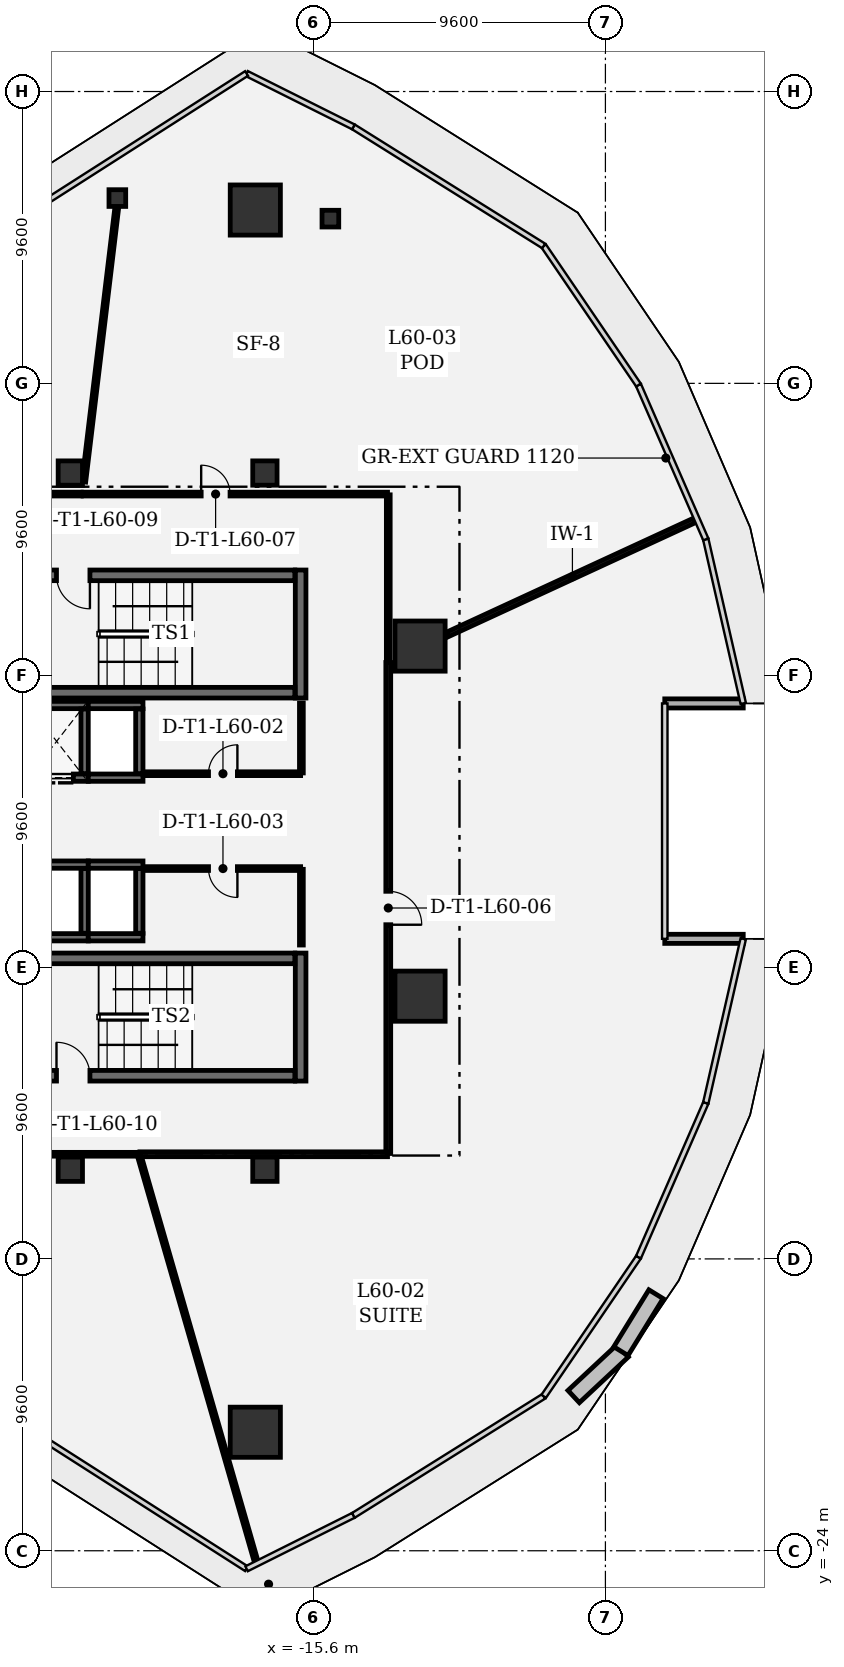
"""IFC4 building model, lengths in metres.
Left out: names, types, materials, properties, quantities, classifications, styles, units other than length and angle.
Written with IfcOpenShell. Run it as: python <this file> out.ifc"""

import sys

from ifc_helpers import new_model, si_unit, direction, frame, frame_2d, origin, origin_2d, place, context, subcontext, project, spatial, rectangle, extrude, element, fill, save


model = new_model("IFC4")
c1 = context("Model", 3, precision=1e-05, world=origin(), true_north=direction((0.0, 1.0)))
c2 = subcontext(c1, "Body", "Model", "MODEL_VIEW")
j1 = project(units=[si_unit("LENGTHUNIT", "METRE"), si_unit("PLANEANGLEUNIT", "RADIAN")], contexts=[c1])
p1 = place(None, origin())
s1 = spatial("IfcSite", under=j1, at=p1, CompositionType="ELEMENT")
p2 = place(p1, origin())
s2 = spatial("IfcBuilding", under=s1, at=p2, CompositionType="ELEMENT")
p3 = place(p2, frame((0.0, 0.0, 259.8)))
s3 = spatial("IfcBuildingStorey", under=s2, at=p3, CompositionType="ELEMENT", Elevation=259.8)
for number, where, z_axis, x_axis in (
    (1, (-17.515, -20.102, 0.0), (0.0, 0.0, 1.0), (1.0, 0.0, 0.0)),
    (2, (-12.097, -5.758, 0.0), (0.0, 0.0, 1.0), (1.0, 0.0, 0.0)),
    (3, (-12.097, 5.758, 0.0), (0.0, 0.0, 1.0), (1.0, 0.0, 0.0)),
    (4, (-17.515, 20.102, 0.0), (0.0, 0.0, 1.0), (1.0, 0.0, 0.0)),
):
    element("IfcColumn", number, at=place(p3, frame(where, z_axis=z_axis, x_axis=x_axis)), inside=s3, PredefinedType="COLUMN", context=c2, shape_type="SweptSolid", body=[
        extrude(rectangle(XDim=1.65, YDim=1.65, at=origin_2d()), origin(), (0.0, 0.0, 1.0), 4.2),
    ])
for number, where, z_axis, x_axis in (
    (5, (-23.6, 11.45, 0.0), (0.0, 0.0, 1.0), (1.0, 0.0, 0.0)),
    (6, (-17.2, 11.45, 0.0), (0.0, 0.0, 1.0), (1.0, 0.0, 0.0)),
    (7, (-17.2, -11.45, 0.0), (0.0, 0.0, 1.0), (1.0, 0.0, 0.0)),
    (8, (-23.6, -11.45, 0.0), (0.0, 0.0, 1.0), (1.0, 0.0, 0.0)),
):
    element("IfcColumn", number, at=place(p3, frame(where, z_axis=z_axis, x_axis=x_axis)), inside=s3, PredefinedType="COLUMN", context=c2, shape_type="SweptSolid", body=[
        extrude(rectangle(XDim=0.8, YDim=0.8, at=origin_2d()), origin(), (0.0, 0.0, 1.0), 4.2),
    ])
for number, where, z_axis, x_axis in (
    (9, (-22.053, 20.495, 0.0), (0.0, 0.0, 1.0), (1.0, 0.0, 0.0)),
    (10, (-15.046, 19.818, 0.0), (0.0, 0.0, 1.0), (1.0, 0.0, 0.0)),
):
    element("IfcColumn", number, at=place(p3, frame(where, z_axis=z_axis, x_axis=x_axis)), inside=s3, PredefinedType="COLUMN", context=c2, shape_type="SweptSolid", body=[
        extrude(rectangle(XDim=0.55, YDim=0.55, at=origin_2d()), origin(), (0.0, 0.0, 1.0), 4.2),
    ])
for number, where, z_axis, x_axis in (
    (11, (-1.467, -3.872, 0.0), (0.0, 0.0, 1.0), (-1.0, 0.0, 0.0)),
    (12, (-4.048, 3.872, 0.0), (0.0, 0.0, 1.0), (1.0, 0.0, 0.0)),
):
    element("IfcWall", number, at=place(p3, frame(where, z_axis=z_axis, x_axis=x_axis)), inside=s3, PredefinedType="SOLIDWALL", context=c2, shape_type="SweptSolid", body=[
        extrude(rectangle(XDim=2.581, YDim=0.3, at=frame_2d((1.291, 0.0))), origin(), (0.0, 0.0, 1.0), 3.91),
    ])
p4 = place(p3, frame((-16.025, 4.05, 0.0), z_axis=(0.0, 0.0, 1.0), x_axis=(0.0, 1.0, 0.0)))
e13 = element("IfcWall", 13, at=p4, inside=s3, PredefinedType="SHEAR", context=c2, shape_type="SweptSolid", body=[
    extrude(rectangle(XDim=4.21, YDim=0.35, at=frame_2d((2.105, 0.0))), origin(), (0.0, 0.0, 1.0), 3.91),
])
p5 = place(p3, frame((-24.335, 4.225, 0.0), z_axis=(0.0, 0.0, 1.0), x_axis=(1.0, 0.0, 0.0)))
e14 = element("IfcWall", 14, at=p5, inside=s3, PredefinedType="SHEAR", context=c2, shape_type="SweptSolid", body=[
    extrude(rectangle(XDim=8.12, YDim=0.35, at=frame_2d((4.06, 0.0))), origin(), (0.0, 0.0, 1.0), 3.91),
])
p6 = place(p3, frame((-16.215, 8.085, 0.0), z_axis=(0.0, 0.0, 1.0), x_axis=(-1.0, 0.0, 0.0)))
e15 = element("IfcWall", 15, at=p6, inside=s3, PredefinedType="SHEAR", context=c2, shape_type="SweptSolid", body=[
    extrude(rectangle(XDim=8.12, YDim=0.35, at=frame_2d((4.06, 0.0))), origin(), (0.0, 0.0, 1.0), 3.91),
])
p7 = place(p6, frame((6.74, 0.0, 0.0)))
e16 = element("IfcOpeningElement", 16, at=p7, cuts=e15, PredefinedType="OPENING", context=c2, shape_type="SweptSolid", body=[
    extrude(rectangle(XDim=1.1, YDim=2.2, at=frame_2d((0.55, 1.1))), frame((0.0, 0.185, 0.0), z_axis=(0.0, -1.0, 0.0), x_axis=(1.0, 0.0, 0.0)), (0.0, 0.0, 1.0), 0.37),
])
p8 = place(p3, frame((-16.025, -8.55, 0.0), z_axis=(0.0, 0.0, 1.0), x_axis=(0.0, 1.0, 0.0)))
e17 = element("IfcWall", 17, at=p8, inside=s3, PredefinedType="SHEAR", context=c2, shape_type="SweptSolid", body=[
    extrude(rectangle(XDim=4.21, YDim=0.35, at=frame_2d((2.105, 0.0))), origin(), (0.0, 0.0, 1.0), 3.91),
])
p9 = place(p3, frame((-24.335, -8.375, 0.0), z_axis=(0.0, 0.0, 1.0), x_axis=(1.0, 0.0, 0.0)))
e18 = element("IfcWall", 18, at=p9, inside=s3, PredefinedType="SHEAR", context=c2, shape_type="SweptSolid", body=[
    extrude(rectangle(XDim=8.12, YDim=0.35, at=frame_2d((4.06, 0.0))), origin(), (0.0, 0.0, 1.0), 3.91),
])
p10 = place(p9, frame((0.28, 0.0, 0.0)))
e19 = element("IfcOpeningElement", 19, at=p10, cuts=e18, PredefinedType="OPENING", context=c2, shape_type="SweptSolid", body=[
    extrude(rectangle(XDim=1.1, YDim=2.2, at=frame_2d((0.55, 1.1))), frame((0.0, 0.185, 0.0), z_axis=(0.0, -1.0, 0.0), x_axis=(1.0, 0.0, 0.0)), (0.0, 0.0, 1.0), 0.37),
])
p11 = place(p3, frame((-16.215, -4.515, 0.0), z_axis=(0.0, 0.0, 1.0), x_axis=(-1.0, 0.0, 0.0)))
e20 = element("IfcWall", 20, at=p11, inside=s3, PredefinedType="SHEAR", context=c2, shape_type="SweptSolid", body=[
    extrude(rectangle(XDim=8.12, YDim=0.35, at=frame_2d((4.06, 0.0))), origin(), (0.0, 0.0, 1.0), 3.91),
])
p12 = place(p3, frame((-23.01, 1.43, 0.0), z_axis=(0.0, 0.0, 1.0), x_axis=(-1.0, 0.0, 0.0)))
e21 = element("IfcWall", 21, at=p12, inside=s3, PredefinedType="SHEAR", context=c2, shape_type="SweptSolid", body=[
    extrude(rectangle(XDim=1.8, YDim=0.24, at=frame_2d((0.9, 0.0))), origin(), (0.0, 0.0, 1.0), 3.91),
])
p13 = place(p12, frame((0.49, 0.0, 0.0)))
e22 = element("IfcOpeningElement", 22, at=p13, cuts=e21, PredefinedType="OPENING", context=c2, shape_type="SweptSolid", body=[
    extrude(rectangle(XDim=1.1, YDim=2.2, at=frame_2d((0.55, 1.1))), frame((0.0, 0.13, 0.0), z_axis=(0.0, -1.0, 0.0), x_axis=(1.0, 0.0, 0.0)), (0.0, 0.0, 1.0), 0.26),
])
p14 = place(p3, frame((-24.81, 3.82, 0.0), z_axis=(0.0, 0.0, 1.0), x_axis=(1.0, 0.0, 0.0)))
e23 = element("IfcWall", 23, at=p14, inside=s3, PredefinedType="SHEAR", context=c2, shape_type="SweptSolid", body=[
    extrude(rectangle(XDim=1.8, YDim=0.24, at=frame_2d((0.9, 0.0))), origin(), (0.0, 0.0, 1.0), 3.91),
])
p15 = place(p3, frame((-23.13, 3.688, 0.0), z_axis=(0.0, 0.0, 1.0), x_axis=(0.0, -1.0, 0.0)))
e24 = element("IfcWall", 24, at=p15, inside=s3, PredefinedType="SHEAR", context=c2, shape_type="SweptSolid", body=[
    extrude(rectangle(XDim=2.126, YDim=0.24, at=frame_2d((1.063, 0.0))), origin(), (0.0, 0.0, 1.0), 3.91),
])
for number, where, z_axis, x_axis in (
    (25, (-21.21, 1.43, 0.0), (0.0, 0.0, 1.0), (-1.0, 0.0, 0.0)),
    (26, (-23.01, 3.82, 0.0), (0.0, 0.0, 1.0), (1.0, 0.0, 0.0)),
):
    element("IfcWall", number, at=place(p3, frame(where, z_axis=z_axis, x_axis=x_axis)), inside=s3, PredefinedType="SHEAR", context=c2, shape_type="SweptSolid", body=[
        extrude(rectangle(XDim=1.8, YDim=0.24, at=frame_2d((0.9, 0.0))), origin(), (0.0, 0.0, 1.0), 3.91),
    ])
p16 = place(p3, frame((-21.33, 3.688, 0.0), z_axis=(0.0, 0.0, 1.0), x_axis=(0.0, -1.0, 0.0)))
e27 = element("IfcWall", 27, at=p16, inside=s3, PredefinedType="SHEAR", context=c2, shape_type="SweptSolid", body=[
    extrude(rectangle(XDim=2.126, YDim=0.24, at=frame_2d((1.063, 0.0))), origin(), (0.0, 0.0, 1.0), 3.91),
])
for number, where, z_axis, x_axis in (
    (28, (-23.01, -3.82, 0.0), (0.0, 0.0, 1.0), (-1.0, 0.0, 0.0)),
    (29, (-24.81, -1.43, 0.0), (0.0, 0.0, 1.0), (1.0, 0.0, 0.0)),
):
    element("IfcWall", number, at=place(p3, frame(where, z_axis=z_axis, x_axis=x_axis)), inside=s3, PredefinedType="SHEAR", context=c2, shape_type="SweptSolid", body=[
        extrude(rectangle(XDim=1.8, YDim=0.24, at=frame_2d((0.9, 0.0))), origin(), (0.0, 0.0, 1.0), 3.91),
    ])
p17 = place(p3, frame((-23.13, -1.562, 0.0), z_axis=(0.0, 0.0, 1.0), x_axis=(0.0, -1.0, 0.0)))
e30 = element("IfcWall", 30, at=p17, inside=s3, PredefinedType="SHEAR", context=c2, shape_type="SweptSolid", body=[
    extrude(rectangle(XDim=2.126, YDim=0.24, at=frame_2d((1.063, 0.0))), origin(), (0.0, 0.0, 1.0), 3.91),
])
for number, where, z_axis, x_axis in (
    (31, (-21.21, -3.82, 0.0), (0.0, 0.0, 1.0), (-1.0, 0.0, 0.0)),
    (32, (-23.01, -1.43, 0.0), (0.0, 0.0, 1.0), (1.0, 0.0, 0.0)),
):
    element("IfcWall", number, at=place(p3, frame(where, z_axis=z_axis, x_axis=x_axis)), inside=s3, PredefinedType="SHEAR", context=c2, shape_type="SweptSolid", body=[
        extrude(rectangle(XDim=1.8, YDim=0.24, at=frame_2d((0.9, 0.0))), origin(), (0.0, 0.0, 1.0), 3.91),
    ])
p18 = place(p3, frame((-21.33, -1.562, 0.0), z_axis=(0.0, 0.0, 1.0), x_axis=(0.0, -1.0, 0.0)))
e33 = element("IfcWall", 33, at=p18, inside=s3, PredefinedType="SHEAR", context=c2, shape_type="SweptSolid", body=[
    extrude(rectangle(XDim=2.126, YDim=0.24, at=frame_2d((1.063, 0.0))), origin(), (0.0, 0.0, 1.0), 3.91),
])
p19 = place(p3, frame((-21.134, 1.56, 0.0), z_axis=(0.0, 0.0, 1.0), x_axis=(1.0, 0.0, 0.0)))
e34 = element("IfcWall", 34, at=p19, inside=s3, PredefinedType="PARTITIONING", context=c2, shape_type="SweptSolid", body=[
    extrude(rectangle(XDim=5.109, YDim=0.125, at=frame_2d((2.554, 0.0))), origin(), (0.0, 0.0, 1.0), 3.91),
])
p20 = place(p19, frame((2.079, 0.0, 0.0)))
e35 = element("IfcOpeningElement", 35, at=p20, cuts=e34, PredefinedType="OPENING", context=c2, shape_type="SweptSolid", body=[
    extrude(rectangle(XDim=0.95, YDim=2.15, at=frame_2d((0.475, 1.075))), frame((0.0, 0.073, 0.0), z_axis=(0.0, -1.0, 0.0), x_axis=(1.0, 0.0, 0.0)), (0.0, 0.0, 1.0), 0.145),
])
p21 = place(p3, frame((-16.0, 1.585, 0.0), z_axis=(0.0, 0.0, 1.0), x_axis=(0.0, 1.0, 0.0)))
e36 = element("IfcWall", 36, at=p21, inside=s3, PredefinedType="PARTITIONING", context=c2, shape_type="SweptSolid", body=[
    extrude(rectangle(XDim=2.302, YDim=0.125, at=frame_2d((1.151, 0.0))), origin(), (0.0, 0.0, 1.0), 3.91),
])
p22 = place(p3, frame((-16.0, -4.075, 0.0), z_axis=(0.0, 0.0, 1.0), x_axis=(0.0, 1.0, 0.0)))
e37 = element("IfcWall", 37, at=p22, inside=s3, PredefinedType="PARTITIONING", context=c2, shape_type="SweptSolid", body=[
    extrude(rectangle(XDim=2.49, YDim=0.125, at=frame_2d((1.245, 0.0))), origin(), (0.0, 0.0, 1.0), 3.91),
])
p23 = place(p3, frame((-16.025, -1.56, 0.0), z_axis=(0.0, 0.0, 1.0), x_axis=(-1.0, 0.0, 0.0)))
e38 = element("IfcWall", 38, at=p23, inside=s3, PredefinedType="PARTITIONING", context=c2, shape_type="SweptSolid", body=[
    extrude(rectangle(XDim=5.109, YDim=0.125, at=frame_2d((2.554, 0.0))), origin(), (0.0, 0.0, 1.0), 3.91),
])
p24 = place(p23, frame((2.079, 0.0, 0.0)))
e39 = element("IfcOpeningElement", 39, at=p24, cuts=e38, PredefinedType="OPENING", context=c2, shape_type="SweptSolid", body=[
    extrude(rectangle(XDim=0.95, YDim=2.15, at=frame_2d((0.475, 1.075))), frame((0.0, 0.073, 0.0), z_axis=(0.0, -1.0, 0.0), x_axis=(1.0, 0.0, 0.0)), (0.0, 0.0, 1.0), 0.145),
])
p25 = place(p3, frame((-37.833, -10.958, 0.0), z_axis=(0.0, 0.0, 1.0), x_axis=(1.0, 0.0, 0.0)))
e40 = element("IfcWall", 40, at=p25, inside=s3, PredefinedType="PARTITIONING", context=c2, shape_type="SweptSolid", body=[
    extrude(rectangle(XDim=16.463, YDim=0.125, at=frame_2d((8.231, 0.0))), origin(), (0.0, 0.0, 1.0), 3.13),
])
p26 = place(p25, frame((7.756, 0.0, 0.0)))
e41 = element("IfcOpeningElement", 41, at=p26, cuts=e40, PredefinedType="OPENING", context=c2, shape_type="SweptSolid", body=[
    extrude(rectangle(XDim=0.95, YDim=2.15, at=frame_2d((0.475, 1.075))), frame((0.0, 0.073, 0.0), z_axis=(0.0, -1.0, 0.0), x_axis=(1.0, 0.0, 0.0)), (0.0, 0.0, 1.0), 0.145),
])
p27 = place(p3, frame((-17.49, -24.349, 0.0), z_axis=(0.0, 0.0, 1.0), x_axis=(-0.276670145559, 0.960964947621, 0.0)))
e42 = element("IfcWall", 42, at=p27, inside=s3, PredefinedType="PARTITIONING", context=c2, shape_type="SweptSolid", body=[
    extrude(rectangle(XDim=13.91, YDim=0.125, at=frame_2d((6.955, 0.0))), origin(), (0.0, 0.0, 1.0), 3.107),
])
p28 = place(p3, frame((-13.142, 5.218, 0.0), z_axis=(0.0, 0.0, 1.0), x_axis=(0.0, -1.0, 0.0)))
e43 = element("IfcWall", 43, at=p28, inside=s3, PredefinedType="PARTITIONING", context=c2, shape_type="SweptSolid", body=[
    extrude(rectangle(XDim=16.151, YDim=0.16, at=frame_2d((8.075, 0.0))), origin(), (0.0, 0.0, 1.0), 3.13),
])
p29 = place(p28, frame((7.525, 0.0, 0.0)))
e44 = element("IfcOpeningElement", 44, at=p29, cuts=e43, PredefinedType="OPENING", context=c2, shape_type="SweptSolid", body=[
    extrude(rectangle(XDim=1.1, YDim=2.15, at=frame_2d((0.55, 1.075))), frame((0.0, 0.09, 0.0), z_axis=(0.0, -1.0, 0.0), x_axis=(1.0, 0.0, 0.0)), (0.0, 0.0, 1.0), 0.18),
])
p30 = place(p3, frame((-21.312, -10.958, 0.0), z_axis=(0.0, 0.0, 1.0), x_axis=(1.0, 0.0, 0.0)))
e45 = element("IfcWall", 45, at=p30, inside=s3, PredefinedType="PARTITIONING", context=c2, shape_type="SweptSolid", body=[
    extrude(rectangle(XDim=8.145, YDim=0.16, at=frame_2d((4.073, 0.0))), origin(), (0.0, 0.0, 1.0), 3.529),
])
p31 = place(p3, frame((-3.059, 9.897, 0.0), z_axis=(0.0, 0.0, 1.0), x_axis=(-0.907934704676, -0.419111646276, 0.0)))
e46 = element("IfcWall", 46, at=p31, inside=s3, PredefinedType="PARTITIONING", context=c2, shape_type="SweptSolid", body=[
    extrude(rectangle(XDim=8.976, YDim=0.16, at=frame_2d((4.488, 0.0))), origin(), (0.0, 0.0, 1.0), 3.91),
])
p32 = place(p3, frame((-23.18, 10.758, 0.0), z_axis=(0.0, 0.0, 1.0), x_axis=(1.0, 0.0, 0.0)))
e47 = element("IfcWall", 47, at=p32, inside=s3, PredefinedType="PARTITIONING", context=c2, shape_type="SweptSolid", body=[
    extrude(rectangle(XDim=10.013, YDim=0.125, at=frame_2d((5.007, 0.0))), origin(), (0.0, 0.0, 1.0), 3.529),
])
p33 = place(p32, frame((3.884, 0.0, 0.0)))
e48 = element("IfcOpeningElement", 48, at=p33, cuts=e47, PredefinedType="OPENING", context=c2, shape_type="SweptSolid", body=[
    extrude(rectangle(XDim=0.95, YDim=2.15, at=frame_2d((0.475, 1.075))), frame((0.0, 0.073, 0.0), z_axis=(0.0, -1.0, 0.0), x_axis=(1.0, 0.0, 0.0)), (0.0, 0.0, 1.0), 0.145),
])
p34 = place(p3, frame((-13.142, 5.277, 0.0), z_axis=(0.0, 0.0, 1.0), x_axis=(0.0, 1.0, 0.0)))
e49 = element("IfcWall", 49, at=p34, inside=s3, PredefinedType="PARTITIONING", context=c2, shape_type="SweptSolid", body=[
    extrude(rectangle(XDim=5.457, YDim=0.125, at=frame_2d((2.728, 0.0))), origin(), (0.0, 0.0, 1.0), 3.13),
])
p35 = place(p3, frame((-22.074, 20.155, 0.0), z_axis=(0.0, 0.0, 1.0), x_axis=(-0.119476721167, -0.992837002281, 0.0)))
e50 = element("IfcWall", 50, at=p35, inside=s3, PredefinedType="PARTITIONING", context=c2, shape_type="SweptSolid", body=[
    extrude(rectangle(XDim=9.061, YDim=0.125, at=frame_2d((4.53, 0.0))), origin(), (0.0, 0.0, 1.0), 3.107),
])
p36 = place(p3, frame((-35.604, 10.758, 0.0), z_axis=(0.0, 0.0, 1.0), x_axis=(1.0, 0.0, 0.0)))
e51 = element("IfcWall", 51, at=p36, inside=s3, PredefinedType="PARTITIONING", context=c2, shape_type="SweptSolid", body=[
    extrude(rectangle(XDim=12.365, YDim=0.125, at=frame_2d((6.183, 0.0))), origin(), (0.0, 0.0, 1.0), 3.13),
])
p37 = place(p36, frame((5.708, 0.0, 0.0)))
e52 = element("IfcOpeningElement", 52, at=p37, cuts=e51, PredefinedType="OPENING", context=c2, shape_type="SweptSolid", body=[
    extrude(rectangle(XDim=0.95, YDim=2.15, at=frame_2d((0.475, 1.075))), frame((0.0, 0.073, 0.0), z_axis=(0.0, -1.0, 0.0), x_axis=(1.0, 0.0, 0.0)), (0.0, 0.0, 1.0), 0.145),
])
p38 = place(p7, origin())
e53 = element("IfcDoor", 53, at=p38, inside=s3, OperationType="SINGLE_SWING_LEFT", PredefinedType="DOOR", context=c2, shape_type="SweptSolid", body=[
    extrude(rectangle(XDim=1.1, YDim=2.2, at=frame_2d((0.55, 1.1))), frame((0.0, 0.025, 0.0), z_axis=(0.0, -1.0, 0.0), x_axis=(1.0, 0.0, 0.0)), (0.0, 0.0, 1.0), 0.05),
])
fill(e16, e53)
p39 = place(p10, origin())
e54 = element("IfcDoor", 54, at=p39, inside=s3, OperationType="SINGLE_SWING_LEFT", PredefinedType="DOOR", context=c2, shape_type="SweptSolid", body=[
    extrude(rectangle(XDim=1.1, YDim=2.2, at=frame_2d((0.55, 1.1))), frame((0.0, 0.025, 0.0), z_axis=(0.0, -1.0, 0.0), x_axis=(1.0, 0.0, 0.0)), (0.0, 0.0, 1.0), 0.05),
])
fill(e19, e54)
p40 = place(p13, origin())
e55 = element("IfcDoor", 55, at=p40, inside=s3, OperationType="DOUBLE_DOOR_SLIDING", PredefinedType="DOOR", context=c2, shape_type="SweptSolid", body=[
    extrude(rectangle(XDim=1.1, YDim=2.2, at=frame_2d((0.55, 1.1))), frame((0.0, 0.025, 0.0), z_axis=(0.0, -1.0, 0.0), x_axis=(1.0, 0.0, 0.0)), (0.0, 0.0, 1.0), 0.05),
])
fill(e22, e55)
p41 = place(p20, origin())
e56 = element("IfcDoor", 56, at=p41, inside=s3, OperationType="SINGLE_SWING_RIGHT", PredefinedType="DOOR", context=c2, shape_type="SweptSolid", body=[
    extrude(rectangle(XDim=0.95, YDim=2.15, at=frame_2d((0.475, 1.075))), frame((0.0, 0.025, 0.0), z_axis=(0.0, -1.0, 0.0), x_axis=(1.0, 0.0, 0.0)), (0.0, 0.0, 1.0), 0.05),
])
fill(e35, e56)
p42 = place(p24, origin())
e57 = element("IfcDoor", 57, at=p42, inside=s3, OperationType="SINGLE_SWING_LEFT", PredefinedType="DOOR", context=c2, shape_type="SweptSolid", body=[
    extrude(rectangle(XDim=0.95, YDim=2.15, at=frame_2d((0.475, 1.075))), frame((0.0, 0.025, 0.0), z_axis=(0.0, -1.0, 0.0), x_axis=(1.0, 0.0, 0.0)), (0.0, 0.0, 1.0), 0.05),
])
fill(e39, e57)
p43 = place(p29, origin())
e58 = element("IfcDoor", 58, at=p43, inside=s3, OperationType="SINGLE_SWING_RIGHT", PredefinedType="DOOR", context=c2, shape_type="SweptSolid", body=[
    extrude(rectangle(XDim=1.1, YDim=2.15, at=frame_2d((0.55, 1.075))), frame((0.0, 0.025, 0.0), z_axis=(0.0, -1.0, 0.0), x_axis=(1.0, 0.0, 0.0)), (0.0, 0.0, 1.0), 0.05),
])
fill(e44, e58)
p44 = place(p33, origin())
e59 = element("IfcDoor", 59, at=p44, inside=s3, OperationType="SINGLE_SWING_LEFT", PredefinedType="DOOR", context=c2, shape_type="SweptSolid", body=[
    extrude(rectangle(XDim=0.95, YDim=2.15, at=frame_2d((0.475, 1.075))), frame((0.0, 0.025, 0.0), z_axis=(0.0, -1.0, 0.0), x_axis=(1.0, 0.0, 0.0)), (0.0, 0.0, 1.0), 0.05),
])
fill(e48, e59)
save(model, sys.argv[1])
